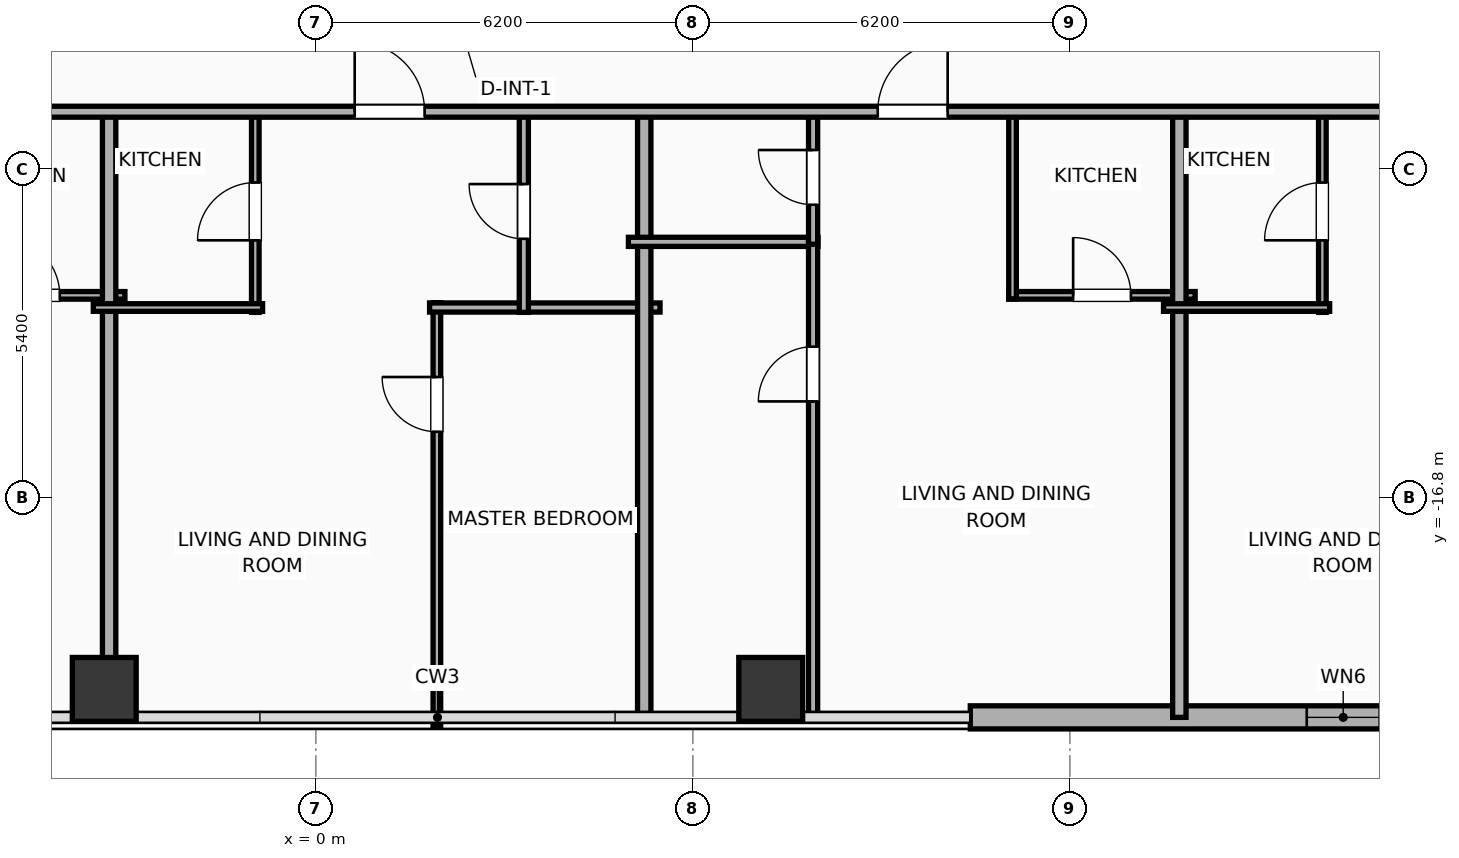
"""IFC4 building model, lengths in metres.
Left out: names, types, materials, properties, quantities, classifications, styles, units other than length and angle.
Written with IfcOpenShell. Run it as: python <this file> out.ifc"""

import sys

from ifc_helpers import new_model, si_unit, direction, frame, frame_2d, origin, origin_2d, place, context, subcontext, project, spatial, rectangle, hollow_rectangle, extrude, element, fill, save


model = new_model("IFC4")
c1 = context("Model", 3, precision=1e-05, world=origin(), true_north=direction((0.0, 1.0)))
c2 = subcontext(c1, "Body", "Model", "MODEL_VIEW")
j1 = project(units=[si_unit("LENGTHUNIT", "METRE"), si_unit("PLANEANGLEUNIT", "RADIAN")], contexts=[c1])
p1 = place(None, origin())
s1 = spatial("IfcSite", under=j1, at=p1, CompositionType="ELEMENT")
p2 = place(p1, origin())
s2 = spatial("IfcBuilding", under=s1, at=p2, CompositionType="ELEMENT")
p3 = place(p2, frame((0.0, 0.0, 117.0)))
s3 = spatial("IfcBuildingStorey", under=s2, at=p3, CompositionType="ELEMENT", Elevation=117.0)
for number, where, z_axis, x_axis in (
    (1, (-3.48, -19.95, 0.0), (0.0, 0.0, 1.0), (1.0, 0.0, 0.0)),
    (2, (7.48, -19.95, 0.0), (0.0, 0.0, 1.0), (1.0, 0.0, 0.0)),
):
    element("IfcColumn", number, at=place(p3, frame(where, z_axis=z_axis, x_axis=x_axis)), inside=s3, PredefinedType="COLUMN", context=c2, shape_type="SweptSolid", body=[
        extrude(hollow_rectangle(XDim=1.05, YDim=1.05, WallThickness=0.036, at=origin_2d()), origin(), (0.0, 0.0, 1.0), 3.9),
    ])
p4 = place(p3, frame((29.381, -20.41, 0.0), z_axis=(0.0, 0.0, 1.0), x_axis=(-1.0, 0.0, 0.0)))
e3 = element("IfcWall", 3, at=p4, inside=s3, PredefinedType="ELEMENTEDWALL", context=c2, shape_type="SweptSolid", body=[
    extrude(rectangle(XDim=18.619, YDim=0.38, at=frame_2d((9.31, 0.0))), origin(), (0.0, 0.0, 1.0), 3.65),
])
p5 = place(p4, frame((11.886, 0.0, 0.75)))
e4 = element("IfcOpeningElement", 4, at=p5, cuts=e3, PredefinedType="OPENING", context=c2, shape_type="SweptSolid", body=[
    extrude(rectangle(XDim=1.2, YDim=2.05, at=frame_2d((0.6, 1.025))), frame((0.0, 0.2, 0.0), z_axis=(0.0, -1.0, 0.0), x_axis=(1.0, 0.0, 0.0)), (0.0, 0.0, 1.0), 0.4),
])
p6 = place(p4, frame((7.486, 0.0, 0.75)))
e5 = element("IfcOpeningElement", 5, at=p6, cuts=e3, PredefinedType="OPENING", context=c2, shape_type="SweptSolid", body=[
    extrude(rectangle(XDim=1.2, YDim=2.05, at=frame_2d((0.6, 1.025))), frame((0.0, 0.2, 0.0), z_axis=(0.0, -1.0, 0.0), x_axis=(1.0, 0.0, 0.0)), (0.0, 0.0, 1.0), 0.4),
])
p7 = place(p4, frame((4.075, 0.0, 0.75)))
e6 = element("IfcOpeningElement", 6, at=p7, cuts=e3, PredefinedType="OPENING", context=c2, shape_type="SweptSolid", body=[
    extrude(rectangle(XDim=1.2, YDim=2.05, at=frame_2d((0.6, 1.025))), frame((0.0, 0.2, 0.0), z_axis=(0.0, -1.0, 0.0), x_axis=(1.0, 0.0, 0.0)), (0.0, 0.0, 1.0), 0.4),
])
p8 = place(p4, frame((1.33, 0.0, 0.75)))
e7 = element("IfcOpeningElement", 7, at=p8, cuts=e3, PredefinedType="OPENING", context=c2, shape_type="SweptSolid", body=[
    extrude(rectangle(XDim=1.2, YDim=2.05, at=frame_2d((0.6, 1.025))), frame((0.0, 0.2, 0.0), z_axis=(0.0, -1.0, 0.0), x_axis=(1.0, 0.0, 0.0)), (0.0, 0.0, 1.0), 0.4),
])
p9 = place(p3, frame((-6.233, -13.47, 0.0), z_axis=(0.0, 0.0, 1.0), x_axis=(1.0, 0.0, 0.0)))
e8 = element("IfcWall", 8, at=p9, inside=s3, PredefinedType="PARTITIONING", context=c2, shape_type="SweptSolid", body=[
    extrude(rectangle(XDim=3.093, YDim=0.125, at=frame_2d((1.546, 0.0))), origin(), (0.0, 0.0, 1.0), 3.65),
])
p10 = place(p9, frame((1.072, 0.0, 0.0)))
e9 = element("IfcOpeningElement", 9, at=p10, cuts=e8, PredefinedType="OPENING", context=c2, shape_type="SweptSolid", body=[
    extrude(rectangle(XDim=0.95, YDim=2.05, at=frame_2d((0.475, 1.025))), frame((0.0, 0.073, 0.0), z_axis=(0.0, -1.0, 0.0), x_axis=(1.0, 0.0, 0.0)), (0.0, 0.0, 1.0), 0.145),
])
p11 = place(p3, frame((-3.4, -20.41, 0.0), z_axis=(0.0, 0.0, 1.0), x_axis=(0.0, 1.0, 0.0)))
e10 = element("IfcWall", 10, at=p11, inside=s3, PredefinedType="PARTITIONING", context=c2, shape_type="SweptSolid", body=[
    extrude(rectangle(XDim=10.04, YDim=0.22, at=frame_2d((5.02, 0.0))), origin(), (0.0, 0.0, 1.0), 3.04),
])
p12 = place(p3, frame((1.99, -20.56, 0.0), z_axis=(0.0, 0.0, 1.0), x_axis=(0.0, 1.0, 0.0)))
e11 = element("IfcWall", 11, at=p12, inside=s3, PredefinedType="PARTITIONING", context=c2, shape_type="SweptSolid", body=[
    extrude(rectangle(XDim=6.97, YDim=0.125, at=frame_2d((3.485, 0.0))), origin(), (0.0, 0.0, 1.0), 3.65),
])
p13 = place(p12, frame((4.847, 0.0, 0.0)))
e12 = element("IfcOpeningElement", 12, at=p13, cuts=e11, PredefinedType="OPENING", context=c2, shape_type="SweptSolid", body=[
    extrude(rectangle(XDim=0.9, YDim=2.05, at=frame_2d((0.45, 1.025))), frame((0.0, 0.073, 0.0), z_axis=(0.0, -1.0, 0.0), x_axis=(1.0, 0.0, 0.0)), (0.0, 0.0, 1.0), 0.145),
])
p14 = place(p3, frame((1.87, -13.67, 0.0), z_axis=(0.0, 0.0, 1.0), x_axis=(1.0, 0.0, 0.0)))
e13 = element("IfcWall", 13, at=p14, inside=s3, PredefinedType="PLUMBINGWALL", context=c2, shape_type="SweptSolid", body=[
    extrude(rectangle(XDim=3.79, YDim=0.15, at=frame_2d((1.895, 0.0))), origin(), (0.0, 0.0, 1.0), 3.65),
])
p15 = place(p3, frame((-0.996, -13.75, 0.0), z_axis=(0.0, 0.0, 1.0), x_axis=(0.0, 1.0, 0.0)))
e14 = element("IfcWall", 14, at=p15, inside=s3, PredefinedType="PARTITIONING", context=c2, shape_type="SweptSolid", body=[
    extrude(rectangle(XDim=3.32, YDim=0.125, at=frame_2d((1.66, 0.0))), origin(), (0.0, 0.0, 1.0), 3.65),
])
p16 = place(p15, frame((1.185, 0.0, 0.0)))
e15 = element("IfcOpeningElement", 15, at=p16, cuts=e14, PredefinedType="OPENING", context=c2, shape_type="SweptSolid", body=[
    extrude(rectangle(XDim=0.95, YDim=2.05, at=frame_2d((0.475, 1.025))), frame((0.0, 0.073, 0.0), z_axis=(0.0, -1.0, 0.0), x_axis=(1.0, 0.0, 0.0)), (0.0, 0.0, 1.0), 0.145),
])
p17 = place(p3, frame((-3.66, -13.67, 0.0), z_axis=(0.0, 0.0, 1.0), x_axis=(1.0, 0.0, 0.0)))
e16 = element("IfcWall", 16, at=p17, inside=s3, PredefinedType="PARTITIONING", context=c2, shape_type="SweptSolid", body=[
    extrude(rectangle(XDim=2.784, YDim=0.125, at=frame_2d((1.392, 0.0))), origin(), (0.0, 0.0, 1.0), 3.65),
])
p18 = place(p3, frame((3.42, -13.75, 0.0), z_axis=(0.0, 0.0, 1.0), x_axis=(0.0, 1.0, 0.0)))
e17 = element("IfcWall", 17, at=p18, inside=s3, PredefinedType="PLUMBINGWALL", context=c2, shape_type="SweptSolid", body=[
    extrude(rectangle(XDim=3.32, YDim=0.15, at=frame_2d((1.66, 0.0))), origin(), (0.0, 0.0, 1.0), 3.65),
])
p19 = place(p18, frame((1.21, 0.0, 0.0)))
e18 = element("IfcOpeningElement", 18, at=p19, cuts=e17, PredefinedType="OPENING", context=c2, shape_type="SweptSolid", body=[
    extrude(rectangle(XDim=0.9, YDim=2.05, at=frame_2d((0.45, 1.025))), frame((0.0, 0.085, 0.0), z_axis=(0.0, -1.0, 0.0), x_axis=(1.0, 0.0, 0.0)), (0.0, 0.0, 1.0), 0.17),
])
p20 = place(p3, frame((5.4, -20.41, 0.0), z_axis=(0.0, 0.0, 1.0), x_axis=(0.0, 1.0, 0.0)))
e19 = element("IfcWall", 19, at=p20, inside=s3, PredefinedType="PARTITIONING", context=c2, shape_type="SweptSolid", body=[
    extrude(rectangle(XDim=10.04, YDim=0.22, at=frame_2d((5.02, 0.0))), origin(), (0.0, 0.0, 1.0), 3.04),
])
p21 = place(p3, frame((5.14, -12.59, 0.0), z_axis=(0.0, 0.0, 1.0), x_axis=(1.0, 0.0, 0.0)))
e20 = element("IfcWall", 20, at=p21, inside=s3, PredefinedType="PLUMBINGWALL", context=c2, shape_type="SweptSolid", body=[
    extrude(rectangle(XDim=3.117, YDim=0.15, at=frame_2d((1.559, 0.0))), origin(), (0.0, 0.0, 1.0), 3.65),
])
p22 = place(p3, frame((8.177, -20.458, 0.0), z_axis=(0.0, 0.0, 1.0), x_axis=(0.0, 1.0, 0.0)))
e21 = element("IfcWall", 21, at=p22, inside=s3, PredefinedType="PLUMBINGWALL", context=c2, shape_type="SweptSolid", body=[
    extrude(rectangle(XDim=7.907, YDim=0.15, at=frame_2d((3.954, 0.0))), origin(), (0.0, 0.0, 1.0), 3.65),
])
p23 = place(p22, frame((5.243, 0.0, 0.0)))
e22 = element("IfcOpeningElement", 22, at=p23, cuts=e21, PredefinedType="OPENING", context=c2, shape_type="SweptSolid", body=[
    extrude(rectangle(XDim=0.9, YDim=2.05, at=frame_2d((0.45, 1.025))), frame((0.0, 0.085, 0.0), z_axis=(0.0, -1.0, 0.0), x_axis=(1.0, 0.0, 0.0)), (0.0, 0.0, 1.0), 0.17),
])
p24 = place(p3, frame((8.177, -12.63, 0.0), z_axis=(0.0, 0.0, 1.0), x_axis=(0.0, 1.0, 0.0)))
e23 = element("IfcWall", 23, at=p24, inside=s3, PredefinedType="PLUMBINGWALL", context=c2, shape_type="SweptSolid", body=[
    extrude(rectangle(XDim=2.2, YDim=0.15, at=frame_2d((1.1, 0.0))), origin(), (0.0, 0.0, 1.0), 3.65),
])
p25 = place(p24, frame((0.65, 0.0, 0.0)))
e24 = element("IfcOpeningElement", 24, at=p25, cuts=e23, PredefinedType="OPENING", context=c2, shape_type="SweptSolid", body=[
    extrude(rectangle(XDim=0.9, YDim=2.05, at=frame_2d((0.45, 1.025))), frame((0.0, 0.085, 0.0), z_axis=(0.0, -1.0, 0.0), x_axis=(1.0, 0.0, 0.0)), (0.0, 0.0, 1.0), 0.17),
])
p26 = place(p3, frame((11.397, -13.47, 0.0), z_axis=(0.0, 0.0, 1.0), x_axis=(1.0, 0.0, 0.0)))
e25 = element("IfcWall", 25, at=p26, inside=s3, PredefinedType="PARTITIONING", context=c2, shape_type="SweptSolid", body=[
    extrude(rectangle(XDim=3.063, YDim=0.125, at=frame_2d((1.531, 0.0))), origin(), (0.0, 0.0, 1.0), 3.65),
])
p27 = place(p26, frame((1.056, 0.0, 0.0)))
e26 = element("IfcOpeningElement", 26, at=p27, cuts=e25, PredefinedType="OPENING", context=c2, shape_type="SweptSolid", body=[
    extrude(rectangle(XDim=0.95, YDim=2.05, at=frame_2d((0.475, 1.025))), frame((0.0, 0.073, 0.0), z_axis=(0.0, -1.0, 0.0), x_axis=(1.0, 0.0, 0.0)), (0.0, 0.0, 1.0), 0.145),
])
p28 = place(p3, frame((11.457, -13.53, 0.0), z_axis=(0.0, 0.0, 1.0), x_axis=(0.0, 1.0, 0.0)))
e27 = element("IfcWall", 27, at=p28, inside=s3, PredefinedType="PARTITIONING", context=c2, shape_type="SweptSolid", body=[
    extrude(rectangle(XDim=3.1, YDim=0.125, at=frame_2d((1.55, 0.0))), origin(), (0.0, 0.0, 1.0), 3.65),
])
p29 = place(p3, frame((14.2, -20.41, 0.0), z_axis=(0.0, 0.0, 1.0), x_axis=(0.0, 1.0, 0.0)))
e28 = element("IfcWall", 28, at=p29, inside=s3, PredefinedType="PARTITIONING", context=c2, shape_type="SweptSolid", body=[
    extrude(rectangle(XDim=10.04, YDim=0.22, at=frame_2d((5.02, 0.0))), origin(), (0.0, 0.0, 1.0), 3.65),
])
p30 = place(p3, frame((16.552, -13.75, 0.0), z_axis=(0.0, 0.0, 1.0), x_axis=(0.0, 1.0, 0.0)))
e29 = element("IfcWall", 29, at=p30, inside=s3, PredefinedType="PARTITIONING", context=c2, shape_type="SweptSolid", body=[
    extrude(rectangle(XDim=3.32, YDim=0.125, at=frame_2d((1.66, 0.0))), origin(), (0.0, 0.0, 1.0), 3.65),
])
p31 = place(p30, frame((1.185, 0.0, 0.0)))
e30 = element("IfcOpeningElement", 30, at=p31, cuts=e29, PredefinedType="OPENING", context=c2, shape_type="SweptSolid", body=[
    extrude(rectangle(XDim=0.95, YDim=2.05, at=frame_2d((0.475, 1.025))), frame((0.0, 0.073, 0.0), z_axis=(0.0, -1.0, 0.0), x_axis=(1.0, 0.0, 0.0)), (0.0, 0.0, 1.0), 0.145),
])
p32 = place(p3, frame((13.94, -13.67, 0.0), z_axis=(0.0, 0.0, 1.0), x_axis=(1.0, 0.0, 0.0)))
e31 = element("IfcWall", 31, at=p32, inside=s3, PredefinedType="PARTITIONING", context=c2, shape_type="SweptSolid", body=[
    extrude(rectangle(XDim=2.732, YDim=0.125, at=frame_2d((1.366, 0.0))), origin(), (0.0, 0.0, 1.0), 3.65),
])
p33 = place(p3, frame((-29.21, -10.45, 0.0), z_axis=(0.0, 0.0, 1.0), x_axis=(1.0, 0.0, 0.0)))
e32 = element("IfcWall", 32, at=p33, inside=s3, PredefinedType="PARTITIONING", context=c2, shape_type="SweptSolid", body=[
    extrude(rectangle(XDim=62.42, YDim=0.18, at=frame_2d((31.21, 0.0))), origin(), (0.0, 0.0, 1.0), 3.65),
])
p34 = place(p33, frame((3.813, 0.0, 0.0)))
e33 = element("IfcOpeningElement", 33, at=p34, cuts=e32, PredefinedType="OPENING", context=c2, shape_type="SweptSolid", body=[
    extrude(rectangle(XDim=1.15, YDim=2.05, at=frame_2d((0.575, 1.025))), frame((0.0, 0.1, 0.0), z_axis=(0.0, -1.0, 0.0), x_axis=(1.0, 0.0, 0.0)), (0.0, 0.0, 1.0), 0.2),
])
p35 = place(p33, frame((12.271, 0.0, 0.0)))
e34 = element("IfcOpeningElement", 34, at=p35, cuts=e32, PredefinedType="OPENING", context=c2, shape_type="SweptSolid", body=[
    extrude(rectangle(XDim=1.15, YDim=2.05, at=frame_2d((0.575, 1.025))), frame((0.0, 0.1, 0.0), z_axis=(0.0, -1.0, 0.0), x_axis=(1.0, 0.0, 0.0)), (0.0, 0.0, 1.0), 0.2),
])
p36 = place(p33, frame((20.804, 0.0, 0.0)))
e35 = element("IfcOpeningElement", 35, at=p36, cuts=e32, PredefinedType="OPENING", context=c2, shape_type="SweptSolid", body=[
    extrude(rectangle(XDim=1.15, YDim=2.05, at=frame_2d((0.575, 1.025))), frame((0.0, 0.1, 0.0), z_axis=(0.0, -1.0, 0.0), x_axis=(1.0, 0.0, 0.0)), (0.0, 0.0, 1.0), 0.2),
])
p37 = place(p33, frame((29.848, 0.0, 0.0)))
e36 = element("IfcOpeningElement", 36, at=p37, cuts=e32, PredefinedType="OPENING", context=c2, shape_type="SweptSolid", body=[
    extrude(rectangle(XDim=1.15, YDim=2.05, at=frame_2d((0.575, 1.025))), frame((0.0, 0.1, 0.0), z_axis=(0.0, -1.0, 0.0), x_axis=(1.0, 0.0, 0.0)), (0.0, 0.0, 1.0), 0.2),
])
p38 = place(p33, frame((38.45, 0.0, 0.0)))
e37 = element("IfcOpeningElement", 37, at=p38, cuts=e32, PredefinedType="OPENING", context=c2, shape_type="SweptSolid", body=[
    extrude(rectangle(XDim=1.15, YDim=2.05, at=frame_2d((0.575, 1.025))), frame((0.0, 0.1, 0.0), z_axis=(0.0, -1.0, 0.0), x_axis=(1.0, 0.0, 0.0)), (0.0, 0.0, 1.0), 0.2),
])
p39 = place(p33, frame((47.42, 0.0, 0.0)))
e38 = element("IfcOpeningElement", 38, at=p39, cuts=e32, PredefinedType="OPENING", context=c2, shape_type="SweptSolid", body=[
    extrude(rectangle(XDim=1.15, YDim=2.05, at=frame_2d((0.575, 1.025))), frame((0.0, 0.1, 0.0), z_axis=(0.0, -1.0, 0.0), x_axis=(1.0, 0.0, 0.0)), (0.0, 0.0, 1.0), 0.2),
])
p40 = place(p33, frame((56.92, 0.0, 0.0)))
e39 = element("IfcOpeningElement", 39, at=p40, cuts=e32, PredefinedType="OPENING", context=c2, shape_type="SweptSolid", body=[
    extrude(rectangle(XDim=1.15, YDim=2.05, at=frame_2d((0.575, 1.025))), frame((0.0, 0.1, 0.0), z_axis=(0.0, -1.0, 0.0), x_axis=(1.0, 0.0, 0.0)), (0.0, 0.0, 1.0), 0.2),
])
p41 = place(p5, origin())
e40 = element("IfcWindow", 40, at=p41, inside=s3, PartitioningType="SINGLE_PANEL", PredefinedType="WINDOW", context=c2, shape_type="SweptSolid", body=[
    extrude(rectangle(XDim=1.2, YDim=2.05, at=frame_2d((0.6, 1.025))), frame((0.0, 0.03, 0.0), z_axis=(0.0, -1.0, 0.0), x_axis=(1.0, 0.0, 0.0)), (0.0, 0.0, 1.0), 0.06),
])
fill(e4, e40)
p42 = place(p10, origin())
e41 = element("IfcDoor", 41, at=p42, inside=s3, OperationType="SINGLE_SWING_LEFT", PredefinedType="DOOR", context=c2, shape_type="SweptSolid", body=[
    extrude(rectangle(XDim=0.95, YDim=2.05, at=frame_2d((0.475, 1.025))), frame((0.0, 0.025, 0.0), z_axis=(0.0, -1.0, 0.0), x_axis=(1.0, 0.0, 0.0)), (0.0, 0.0, 1.0), 0.05),
])
fill(e9, e41)
p43 = place(p13, origin())
e42 = element("IfcDoor", 42, at=p43, inside=s3, OperationType="SINGLE_SWING_RIGHT", PredefinedType="DOOR", context=c2, shape_type="SweptSolid", body=[
    extrude(rectangle(XDim=0.9, YDim=2.05, at=frame_2d((0.45, 1.025))), frame((0.0, 0.025, 0.0), z_axis=(0.0, -1.0, 0.0), x_axis=(1.0, 0.0, 0.0)), (0.0, 0.0, 1.0), 0.05),
])
fill(e12, e42)
p44 = place(p16, origin())
e43 = element("IfcDoor", 43, at=p44, inside=s3, OperationType="SINGLE_SWING_LEFT", PredefinedType="DOOR", context=c2, shape_type="SweptSolid", body=[
    extrude(rectangle(XDim=0.95, YDim=2.05, at=frame_2d((0.475, 1.025))), frame((0.0, 0.025, 0.0), z_axis=(0.0, -1.0, 0.0), x_axis=(1.0, 0.0, 0.0)), (0.0, 0.0, 1.0), 0.05),
])
fill(e15, e43)
p45 = place(p19, origin())
e44 = element("IfcDoor", 44, at=p45, inside=s3, OperationType="SINGLE_SWING_RIGHT", PredefinedType="DOOR", context=c2, shape_type="SweptSolid", body=[
    extrude(rectangle(XDim=0.9, YDim=2.05, at=frame_2d((0.45, 1.025))), frame((0.0, 0.025, 0.0), z_axis=(0.0, -1.0, 0.0), x_axis=(1.0, 0.0, 0.0)), (0.0, 0.0, 1.0), 0.05),
])
fill(e18, e44)
p46 = place(p23, origin())
e45 = element("IfcDoor", 45, at=p46, inside=s3, OperationType="SINGLE_SWING_LEFT", PredefinedType="DOOR", context=c2, shape_type="SweptSolid", body=[
    extrude(rectangle(XDim=0.9, YDim=2.05, at=frame_2d((0.45, 1.025))), frame((0.0, 0.025, 0.0), z_axis=(0.0, -1.0, 0.0), x_axis=(1.0, 0.0, 0.0)), (0.0, 0.0, 1.0), 0.05),
])
fill(e22, e45)
p47 = place(p25, origin())
e46 = element("IfcDoor", 46, at=p47, inside=s3, OperationType="SINGLE_SWING_RIGHT", PredefinedType="DOOR", context=c2, shape_type="SweptSolid", body=[
    extrude(rectangle(XDim=0.9, YDim=2.05, at=frame_2d((0.45, 1.025))), frame((0.0, 0.025, 0.0), z_axis=(0.0, -1.0, 0.0), x_axis=(1.0, 0.0, 0.0)), (0.0, 0.0, 1.0), 0.05),
])
fill(e24, e46)
p48 = place(p27, origin())
e47 = element("IfcDoor", 47, at=p48, inside=s3, OperationType="SINGLE_SWING_LEFT", PredefinedType="DOOR", context=c2, shape_type="SweptSolid", body=[
    extrude(rectangle(XDim=0.95, YDim=2.05, at=frame_2d((0.475, 1.025))), frame((0.0, 0.025, 0.0), z_axis=(0.0, -1.0, 0.0), x_axis=(1.0, 0.0, 0.0)), (0.0, 0.0, 1.0), 0.05),
])
fill(e26, e47)
p49 = place(p31, origin())
e48 = element("IfcDoor", 48, at=p49, inside=s3, OperationType="SINGLE_SWING_LEFT", PredefinedType="DOOR", context=c2, shape_type="SweptSolid", body=[
    extrude(rectangle(XDim=0.95, YDim=2.05, at=frame_2d((0.475, 1.025))), frame((0.0, 0.025, 0.0), z_axis=(0.0, -1.0, 0.0), x_axis=(1.0, 0.0, 0.0)), (0.0, 0.0, 1.0), 0.05),
])
fill(e30, e48)
p50 = place(p37, origin())
e49 = element("IfcDoor", 49, at=p50, inside=s3, OperationType="SINGLE_SWING_LEFT", PredefinedType="DOOR", context=c2, shape_type="SweptSolid", body=[
    extrude(rectangle(XDim=1.15, YDim=2.05, at=frame_2d((0.575, 1.025))), frame((0.0, 0.025, 0.0), z_axis=(0.0, -1.0, 0.0), x_axis=(1.0, 0.0, 0.0)), (0.0, 0.0, 1.0), 0.05),
])
fill(e36, e49)
p51 = place(p38, origin())
e50 = element("IfcDoor", 50, at=p51, inside=s3, OperationType="SINGLE_SWING_RIGHT", PredefinedType="DOOR", context=c2, shape_type="SweptSolid", body=[
    extrude(rectangle(XDim=1.15, YDim=2.05, at=frame_2d((0.575, 1.025))), frame((0.0, 0.025, 0.0), z_axis=(0.0, -1.0, 0.0), x_axis=(1.0, 0.0, 0.0)), (0.0, 0.0, 1.0), 0.05),
])
fill(e37, e50)
save(model, sys.argv[1])
